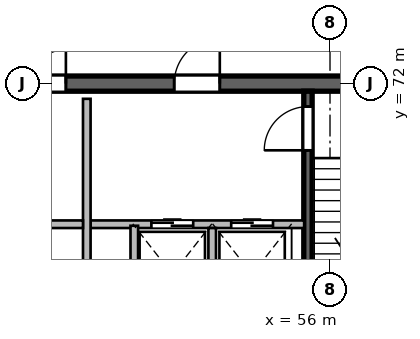
"""IFC4 building model, lengths in metres.
Left out: names, types, materials, properties, quantities, classifications, styles, units other than length and angle.
Written with IfcOpenShell. Run it as: python <this file> out.ifc"""

import sys

from ifc_helpers import new_model, si_unit, direction, frame, frame_2d, origin, place, context, subcontext, project, spatial, rectangle, extrude, source, transform, mapped, element, fill, save


model = new_model("IFC4")
c1 = context("Model", 3, precision=1e-05, world=origin(), true_north=direction((0.0, 1.0)))
c2 = subcontext(c1, "Body", "Model", "MODEL_VIEW")
j1 = project(units=[si_unit("LENGTHUNIT", "METRE"), si_unit("PLANEANGLEUNIT", "RADIAN")], contexts=[c1])
p1 = place(None, origin())
s1 = spatial("IfcSite", under=j1, at=p1, CompositionType="ELEMENT")
p2 = place(p1, origin())
s2 = spatial("IfcBuilding", under=s1, at=p2, CompositionType="ELEMENT")
p3 = place(p2, frame((0.0, 0.0, 267.9)))
s3 = spatial("IfcBuildingStorey", under=s2, at=p3, CompositionType="ELEMENT", Elevation=267.9)
m1 = source(origin(), c2, "Body", "SweptSolid", [
    extrude(rectangle(XDim=21.6, YDim=0.4, at=frame_2d((10.8, 0.0))), origin(), (0.0, 0.0, 1.0), 3.9),
])
p4 = place(p3, frame((37.2, 72.0, 0.0), z_axis=(0.0, 0.0, 1.0), x_axis=(1.0, 0.0, 0.0)))
e1 = element("IfcWall", 1, at=p4, inside=s3, PredefinedType="SHEAR", context=c2, shape_type="MappedRepresentation", body=[
    mapped(m1, transform((0.0, 0.0, 0.0), scale=1.0)),
])
p5 = place(p4, frame((1.2, 0.0, 0.0)))
e2 = element("IfcOpeningElement", 2, at=p5, cuts=e1, PredefinedType="OPENING", context=c2, shape_type="SweptSolid", body=[
    extrude(rectangle(XDim=0.9, YDim=2.1, at=frame_2d((0.45, 1.05))), frame((0.0, 0.21, 0.0), z_axis=(0.0, -1.0, 0.0), x_axis=(1.0, 0.0, 0.0)), (0.0, 0.0, 1.0), 0.42),
])
p6 = place(p4, frame((14.7, 0.0, 0.0)))
e3 = element("IfcOpeningElement", 3, at=p6, cuts=e1, PredefinedType="OPENING", context=c2, shape_type="SweptSolid", body=[
    extrude(rectangle(XDim=1.2, YDim=2.15, at=frame_2d((0.6, 1.075))), frame((0.0, 0.21, 0.0), z_axis=(0.0, -1.0, 0.0), x_axis=(1.0, 0.0, 0.0)), (0.0, 0.0, 1.0), 0.42),
])
p7 = place(p4, frame((4.15, 0.0, 0.0)))
e4 = element("IfcOpeningElement", 4, at=p7, cuts=e1, PredefinedType="OPENING", context=c2, shape_type="SweptSolid", body=[
    extrude(rectangle(XDim=1.3, YDim=2.15, at=frame_2d((0.65, 1.075))), frame((0.0, 0.21, 0.0), z_axis=(0.0, -1.0, 0.0), x_axis=(1.0, 0.0, 0.0)), (0.0, 0.0, 1.0), 0.42),
])
p8 = place(p4, frame((7.25, 0.0, 0.0)))
e5 = element("IfcOpeningElement", 5, at=p8, cuts=e1, PredefinedType="OPENING", context=c2, shape_type="SweptSolid", body=[
    extrude(rectangle(XDim=0.9, YDim=2.1, at=frame_2d((0.45, 1.05))), frame((0.0, 0.21, 0.0), z_axis=(0.0, -1.0, 0.0), x_axis=(1.0, 0.0, 0.0)), (0.0, 0.0, 1.0), 0.42),
])
p9 = place(p4, frame((10.95, 0.0, 0.0)))
e6 = element("IfcOpeningElement", 6, at=p9, cuts=e1, PredefinedType="OPENING", context=c2, shape_type="SweptSolid", body=[
    extrude(rectangle(XDim=0.9, YDim=2.1, at=frame_2d((0.45, 1.05))), frame((0.0, 0.21, 0.0), z_axis=(0.0, -1.0, 0.0), x_axis=(1.0, 0.0, 0.0)), (0.0, 0.0, 1.0), 0.42),
])
m2 = source(origin(), c2, "Body", "SweptSolid", [
    extrude(rectangle(XDim=11.2, YDim=0.22, at=frame_2d((5.6, 0.0))), origin(), (0.0, 0.0, 1.0), 3.9),
])
p10 = place(p3, frame((55.42, 60.6, 0.0), z_axis=(0.0, 0.0, 1.0), x_axis=(0.0, 1.0, 0.0)))
e7 = element("IfcWall", 7, at=p10, inside=s3, PredefinedType="SHEAR", context=c2, shape_type="MappedRepresentation", body=[
    mapped(m2, transform((0.0, 0.0, 0.0), scale=1.0)),
])
p11 = place(p10, frame((9.645, 0.0, 0.0)))
e8 = element("IfcOpeningElement", 8, at=p11, cuts=e7, PredefinedType="OPENING", context=c2, shape_type="SweptSolid", body=[
    extrude(rectangle(XDim=1.15, YDim=2.15, at=frame_2d((0.575, 1.075))), frame((0.0, 0.12, 0.0), z_axis=(0.0, -1.0, 0.0), x_axis=(1.0, 0.0, 0.0)), (0.0, 0.0, 1.0), 0.24),
])
m3 = source(origin(), c2, "Body", "SweptSolid", [
    extrude(rectangle(XDim=5.62, YDim=0.2, at=frame_2d((2.81, 0.0))), origin(), (0.0, 0.0, 1.0), 3.65),
])
p12 = place(p3, frame((49.7, 68.3, 0.0), z_axis=(0.0, 0.0, 1.0), x_axis=(1.0, 0.0, 0.0)))
e9 = element("IfcWall", 9, at=p12, inside=s3, PredefinedType="SOLIDWALL", context=c2, shape_type="MappedRepresentation", body=[
    mapped(m3, transform((0.0, 0.0, 0.0), scale=1.0)),
])
p13 = place(p12, frame((1.6, 0.0, 0.0)))
e10 = element("IfcOpeningElement", 10, at=p13, cuts=e9, PredefinedType="OPENING", context=c2, shape_type="SweptSolid", body=[
    extrude(rectangle(XDim=1.1, YDim=2.15, at=frame_2d((0.55, 1.075))), frame((0.0, 0.11, 0.0), z_axis=(0.0, -1.0, 0.0), x_axis=(1.0, 0.0, 0.0)), (0.0, 0.0, 1.0), 0.22),
])
p14 = place(p12, frame((3.7, 0.0, 0.0)))
e11 = element("IfcOpeningElement", 11, at=p14, cuts=e9, PredefinedType="OPENING", context=c2, shape_type="SweptSolid", body=[
    extrude(rectangle(XDim=1.1, YDim=2.15, at=frame_2d((0.55, 1.075))), frame((0.0, 0.11, 0.0), z_axis=(0.0, -1.0, 0.0), x_axis=(1.0, 0.0, 0.0)), (0.0, 0.0, 1.0), 0.22),
])
m4 = source(origin(), c2, "Body", "SweptSolid", [
    extrude(rectangle(XDim=5.8, YDim=0.2, at=frame_2d((2.9, 0.0))), origin(), (0.0, 0.0, 1.0), 3.65),
])
p15 = place(p3, frame((49.6, 65.8, 0.0), z_axis=(0.0, 0.0, 1.0), x_axis=(0.0, 1.0, 0.0)))
e12 = element("IfcWall", 12, at=p15, inside=s3, PredefinedType="SOLIDWALL", context=c2, shape_type="MappedRepresentation", body=[
    mapped(m4, transform((0.0, 0.0, 0.0), scale=1.0)),
])
m5 = source(origin(), c2, "Body", "SweptSolid", [
    extrude(rectangle(XDim=2.58, YDim=0.2, at=frame_2d((1.29, 0.0))), origin(), (0.0, 0.0, 1.0), 3.65),
])
p16 = place(p3, frame((50.85, 65.68, 0.0), z_axis=(0.0, 0.0, 1.0), x_axis=(0.0, 1.0, 0.0)))
e13 = element("IfcWall", 13, at=p16, inside=s3, PredefinedType="SOLIDWALL", context=c2, shape_type="MappedRepresentation", body=[
    mapped(m5, transform((0.0, 0.0, 0.0), scale=1.0)),
])
m6 = source(origin(), c2, "Body", "SweptSolid", [
    extrude(rectangle(XDim=2.4, YDim=0.2, at=frame_2d((1.2, 0.0))), origin(), (0.0, 0.0, 1.0), 3.65),
])
p17 = place(p3, frame((52.9, 65.8, 0.0), z_axis=(0.0, 0.0, 1.0), x_axis=(0.0, 1.0, 0.0)))
e14 = element("IfcWall", 14, at=p17, inside=s3, PredefinedType="SOLIDWALL", context=c2, shape_type="MappedRepresentation", body=[
    mapped(m6, transform((0.0, 0.0, 0.0), scale=1.0)),
])
m7 = source(origin(), c2, "Body", "SweptSolid", [
    extrude(rectangle(XDim=8.8, YDim=0.2, at=frame_2d((4.4, 0.0))), origin(), (0.0, 0.0, 1.0), 3.65),
])
p18 = place(p3, frame((40.7, 68.3, 0.0), z_axis=(0.0, 0.0, 1.0), x_axis=(1.0, 0.0, 0.0)))
e15 = element("IfcWall", 15, at=p18, inside=s3, PredefinedType="SOLIDWALL", context=c2, shape_type="MappedRepresentation", body=[
    mapped(m7, transform((0.0, 0.0, 0.0), scale=1.0)),
])
m8 = source(origin(), c2, "Body", "SweptSolid", [
    extrude(rectangle(XDim=1.15, YDim=2.15, at=frame_2d((0.575, 1.075))), frame((0.0, 0.025, 0.0), z_axis=(0.0, -1.0, 0.0), x_axis=(1.0, 0.0, 0.0)), (0.0, 0.0, 1.0), 0.05),
])
p19 = place(p11, origin())
e16 = element("IfcDoor", 16, at=p19, inside=s3, OperationType="SINGLE_SWING_LEFT", PredefinedType="DOOR", context=c2, shape_type="MappedRepresentation", body=[
    mapped(m8, transform((0.0, 0.0, 0.0), scale=1.0)),
])
fill(e8, e16)
m9 = source(origin(), c2, "Body", "SweptSolid", [
    extrude(rectangle(XDim=1.2, YDim=2.15, at=frame_2d((0.6, 1.075))), frame((0.0, 0.025, 0.0), z_axis=(0.0, -1.0, 0.0), x_axis=(1.0, 0.0, 0.0)), (0.0, 0.0, 1.0), 0.05),
])
p20 = place(p6, origin())
e17 = element("IfcDoor", 17, at=p20, inside=s3, OperationType="SINGLE_SWING_RIGHT", PredefinedType="DOOR", context=c2, shape_type="MappedRepresentation", body=[
    mapped(m9, transform((0.0, 0.0, 0.0), scale=1.0)),
])
fill(e3, e17)
m10 = source(origin(), c2, "Body", "SweptSolid", [
    extrude(rectangle(XDim=1.1, YDim=2.15, at=frame_2d((0.55, 1.075))), frame((0.0, 0.025, 0.0), z_axis=(0.0, -1.0, 0.0), x_axis=(1.0, 0.0, 0.0)), (0.0, 0.0, 1.0), 0.05),
])
p21 = place(p13, origin())
e18 = element("IfcDoor", 18, at=p21, inside=s3, OperationType="DOUBLE_DOOR_SLIDING", PredefinedType="DOOR", context=c2, shape_type="MappedRepresentation", body=[
    mapped(m10, transform((0.0, 0.0, 0.0), scale=1.0)),
])
fill(e10, e18)
p22 = place(p14, origin())
e19 = element("IfcDoor", 19, at=p22, inside=s3, OperationType="DOUBLE_DOOR_SLIDING", PredefinedType="DOOR", context=c2, shape_type="MappedRepresentation", body=[
    mapped(m10, transform((0.0, 0.0, 0.0), scale=1.0)),
])
fill(e11, e19)
m11 = source(origin(), c2, "Body", "SweptSolid", [
    extrude(rectangle(XDim=0.9, YDim=2.1, at=frame_2d((0.45, 1.05))), frame((0.0, 0.025, 0.0), z_axis=(0.0, -1.0, 0.0), x_axis=(1.0, 0.0, 0.0)), (0.0, 0.0, 1.0), 0.05),
])
p23 = place(p9, origin())
e20 = element("IfcDoor", 20, at=p23, inside=s3, OperationType="SINGLE_SWING_RIGHT", PredefinedType="DOOR", context=c2, shape_type="MappedRepresentation", body=[
    mapped(m11, transform((0.0, 0.0, 0.0), scale=1.0)),
])
fill(e6, e20)
save(model, sys.argv[1])
